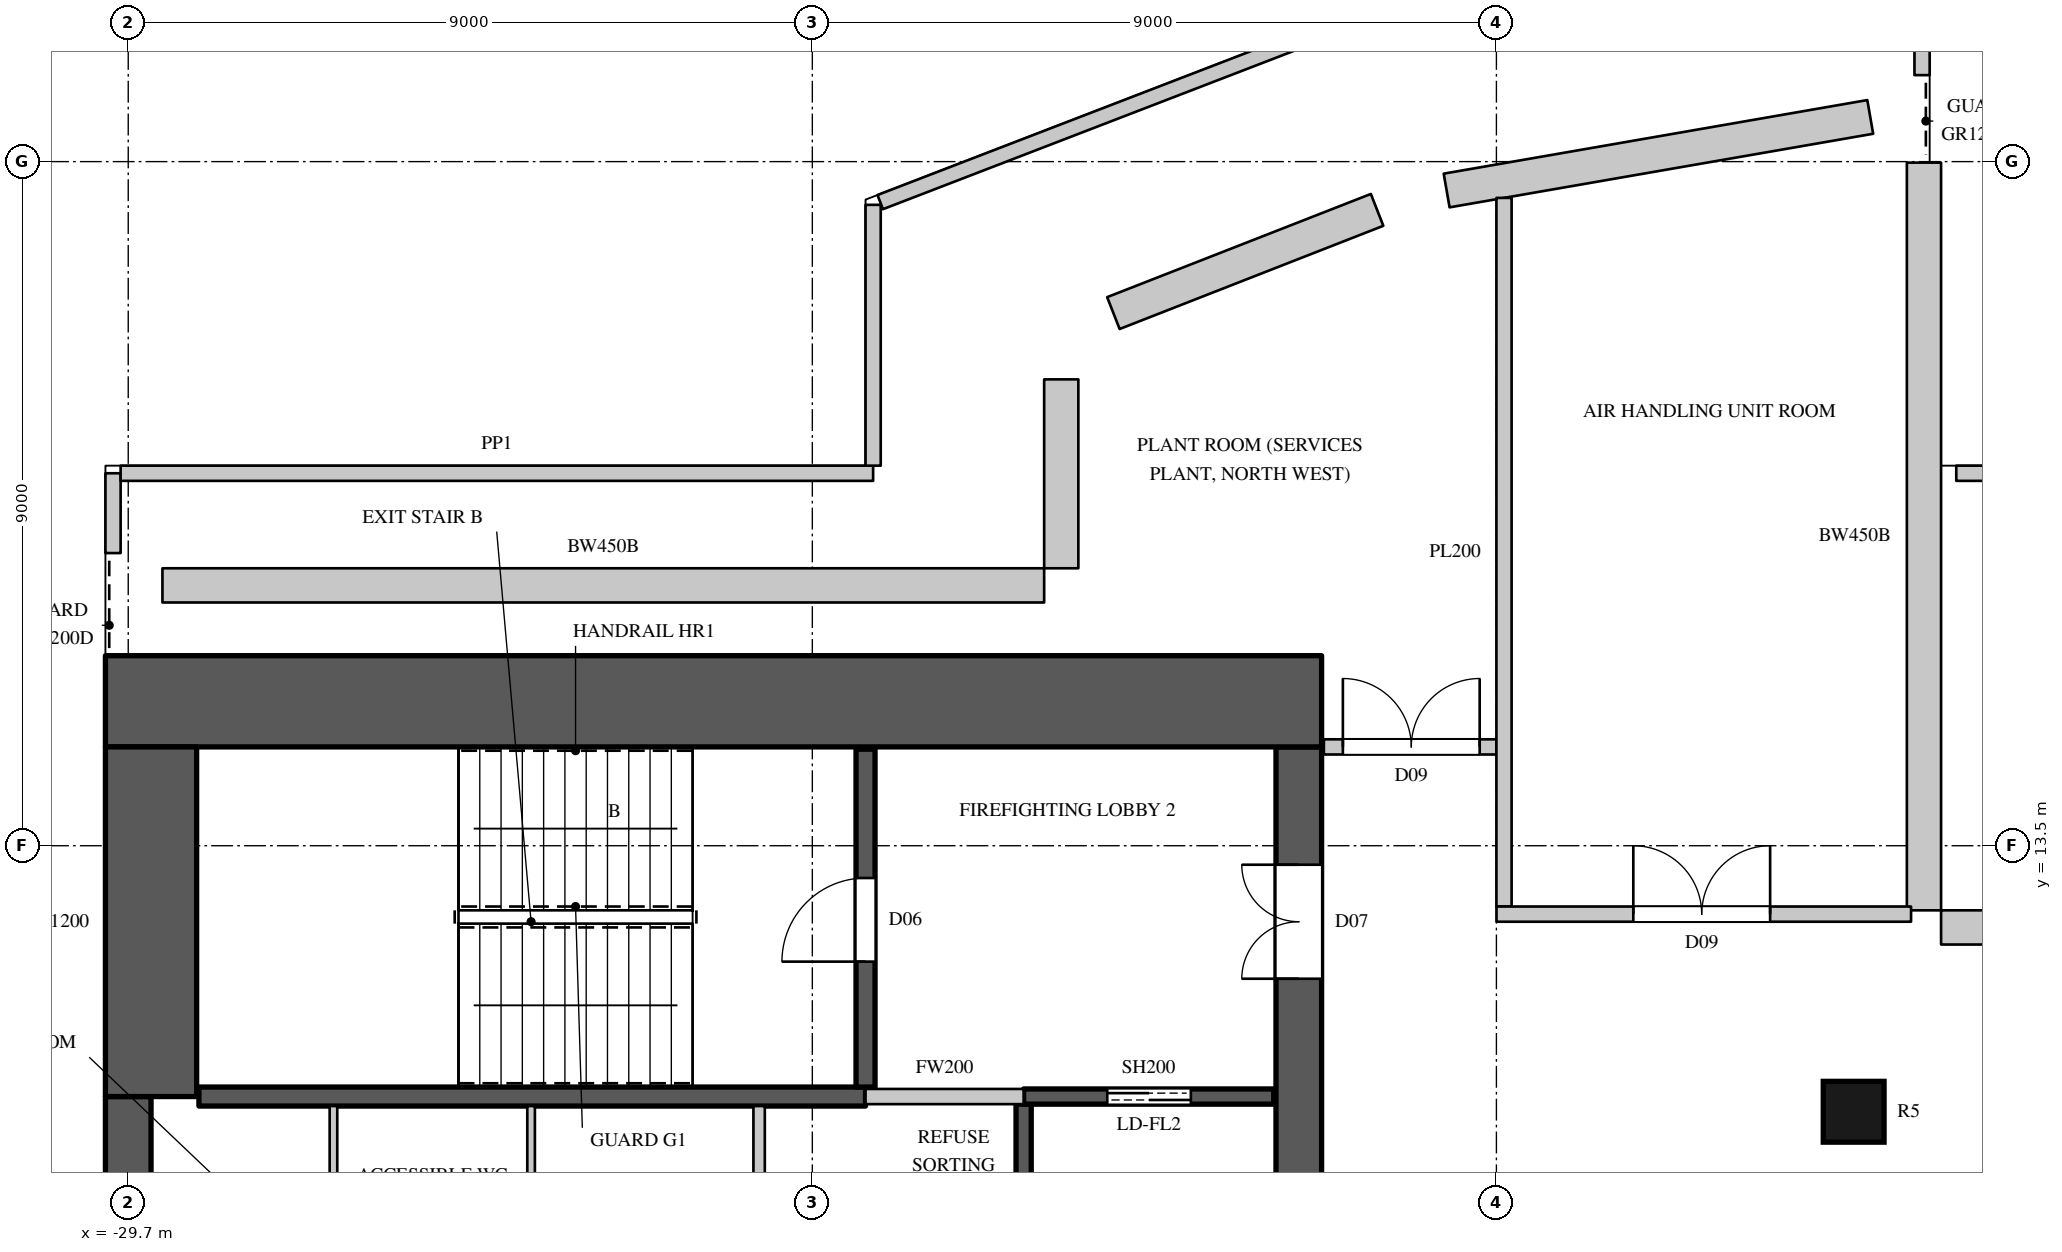
"""IFC4 building model, lengths in metres.
Left out: names, types, materials, properties, quantities, classifications, styles, units other than length and angle.
Written with IfcOpenShell. Run it as: python <this file> out.ifc"""

import sys

from ifc_helpers import new_model, si_unit, direction, frame, frame_2d, origin, origin_2d, place, context, subcontext, project, spatial, rectangle, circle, extrude, element, fill, save


model = new_model("IFC4")
c1 = context("Model", 3, precision=1e-05, world=origin(), true_north=direction((0.0, 1.0)))
c2 = subcontext(c1, "Body", "Model", "MODEL_VIEW")
j1 = project(units=[si_unit("LENGTHUNIT", "METRE"), si_unit("PLANEANGLEUNIT", "RADIAN")], contexts=[c1])
p1 = place(None, origin())
s1 = spatial("IfcSite", under=j1, at=p1, CompositionType="ELEMENT")
p2 = place(p1, origin())
s2 = spatial("IfcBuilding", under=s1, at=p2, CompositionType="ELEMENT")
p3 = place(p2, frame((0.0, 0.0, 343.0)))
s3 = spatial("IfcBuildingStorey", under=s2, at=p3, CompositionType="ELEMENT", Elevation=343.0)
p4 = place(p3, frame((-7.0, 10.0, 0.0), z_axis=(0.0, 0.0, 1.0), x_axis=(1.0, 0.0, 0.0)))
e1 = element("IfcColumn", 1, at=p4, inside=s3, PredefinedType="COLUMN", context=c2, shape_type="SweptSolid", body=[
    extrude(circle(Radius=0.4, at=origin_2d()), origin(), (0.0, 0.0, 1.0), 4.0),
])
p5 = place(p3, frame((-29.9, 17.35, 0.0), z_axis=(0.0, 0.0, 1.0), x_axis=(0.0, 1.0, 0.0)))
e2 = element("IfcWall", 2, at=p5, inside=s3, PredefinedType="SOLIDWALL", context=c2, shape_type="SweptSolid", body=[
    extrude(rectangle(XDim=1.05, YDim=0.2, at=frame_2d((0.525, 0.0))), origin(), (0.0, 0.0, 1.0), 1.1),
])
p6 = place(p3, frame((-29.8, 18.4, 0.0), z_axis=(0.0, 0.0, 1.0), x_axis=(1.0, 0.0, 0.0)))
e3 = element("IfcWall", 3, at=p6, inside=s3, PredefinedType="SOLIDWALL", context=c2, shape_type="SweptSolid", body=[
    extrude(rectangle(XDim=9.9, YDim=0.2, at=frame_2d((4.95, 0.0))), origin(), (0.0, 0.0, 1.0), 1.1),
])
p7 = place(p3, frame((-19.9, 18.5, 0.0), z_axis=(0.0, 0.0, 1.0), x_axis=(0.0, 1.0, 0.0)))
e4 = element("IfcWall", 4, at=p7, inside=s3, PredefinedType="SOLIDWALL", context=c2, shape_type="SweptSolid", body=[
    extrude(rectangle(XDim=3.431, YDim=0.2, at=frame_2d((1.716, 0.0))), origin(), (0.0, 0.0, 1.0), 1.1),
])
p8 = place(p3, frame((-19.807, 21.967, 0.0), z_axis=(0.0, 0.0, 1.0), x_axis=(0.933131239416, 0.359535937045, 0.0)))
e5 = element("IfcWall", 5, at=p8, inside=s3, PredefinedType="SOLIDWALL", context=c2, shape_type="SweptSolid", body=[
    extrude(rectangle(XDim=7.109, YDim=0.2, at=frame_2d((3.554, 0.0))), origin(), (0.0, 0.0, 1.0), 1.1),
])
p9 = place(p3, frame((-6.1, 25.651, 0.0), z_axis=(0.0, 0.0, 1.0), x_axis=(0.0, -1.0, 0.0)))
e6 = element("IfcWall", 6, at=p9, inside=s3, PredefinedType="SOLIDWALL", context=c2, shape_type="SweptSolid", body=[
    extrude(rectangle(XDim=2.013, YDim=0.2, at=frame_2d((1.006, 0.0))), origin(), (0.0, 0.0, 1.0), 1.1),
])
p10 = place(p3, frame((-5.65, 18.4, 0.0), z_axis=(0.0, 0.0, 1.0), x_axis=(1.0, 0.0, 0.0)))
e7 = element("IfcWall", 7, at=p10, inside=s3, PredefinedType="SOLIDWALL", context=c2, shape_type="SweptSolid", body=[
    extrude(rectangle(XDim=1.05, YDim=0.2, at=frame_2d((0.525, 0.0))), origin(), (0.0, 0.0, 1.0), 1.1),
])
p11 = place(p3, frame((7.85, 12.425, 0.0), z_axis=(0.0, 0.0, 1.0), x_axis=(-1.0, 0.0, 0.0)))
e8 = element("IfcWall", 8, at=p11, inside=s3, PredefinedType="SOLIDWALL", context=c2, shape_type="SweptSolid", body=[
    extrude(rectangle(XDim=13.7, YDim=0.45, at=frame_2d((6.85, 0.0))), origin(), (0.0, 0.0, 1.0), 3.7),
])
p12 = place(p3, frame((-6.075, 12.65, 0.0), z_axis=(0.0, 0.0, 1.0), x_axis=(0.0, 1.0, 0.0)))
e9 = element("IfcWall", 9, at=p12, inside=s3, PredefinedType="SOLIDWALL", context=c2, shape_type="SweptSolid", body=[
    extrude(rectangle(XDim=9.837, YDim=0.45, at=frame_2d((4.918, 0.0))), origin(), (0.0, 0.0, 1.0), 3.7),
])
p13 = place(p3, frame((-6.782, 23.088, 0.0), z_axis=(0.0, 0.0, 1.0), x_axis=(-0.985240251318, -0.171177239091, 0.0)))
e10 = element("IfcWall", 10, at=p13, inside=s3, PredefinedType="SOLIDWALL", context=c2, shape_type="SweptSolid", body=[
    extrude(rectangle(XDim=5.656, YDim=0.45, at=frame_2d((2.828, 0.0))), origin(), (0.0, 0.0, 1.0), 3.7),
])
p14 = place(p3, frame((-13.27, 21.865, 0.0), z_axis=(0.0, 0.0, 1.0), x_axis=(-0.931207968362, -0.364488298384, 0.0)))
e11 = element("IfcWall", 11, at=p14, inside=s3, PredefinedType="SOLIDWALL", context=c2, shape_type="SweptSolid", body=[
    extrude(rectangle(XDim=3.726, YDim=0.45, at=frame_2d((1.863, 0.0))), origin(), (0.0, 0.0, 1.0), 3.7),
])
p15 = place(p3, frame((-17.425, 19.635, 0.0), z_axis=(0.0, 0.0, 1.0), x_axis=(0.0, -1.0, 0.0)))
e12 = element("IfcWall", 12, at=p15, inside=s3, PredefinedType="SOLIDWALL", context=c2, shape_type="SweptSolid", body=[
    extrude(rectangle(XDim=2.485, YDim=0.45, at=frame_2d((1.243, 0.0))), origin(), (0.0, 0.0, 1.0), 3.7),
])
p16 = place(p3, frame((-17.65, 16.925, 0.0), z_axis=(0.0, 0.0, 1.0), x_axis=(-1.0, 0.0, 0.0)))
e13 = element("IfcWall", 13, at=p16, inside=s3, PredefinedType="SOLIDWALL", context=c2, shape_type="SweptSolid", body=[
    extrude(rectangle(XDim=11.6, YDim=0.45, at=frame_2d((5.8, 0.0))), origin(), (0.0, 0.0, 1.0), 3.7),
])
p17 = place(p3, frame((-30.0, 15.4, 0.0), z_axis=(0.0, 0.0, 1.0), x_axis=(1.0, 0.0, 0.0)))
e14 = element("IfcWall", 14, at=p17, inside=s3, PredefinedType="SHEAR", context=c2, shape_type="SweptSolid", body=[
    extrude(rectangle(XDim=16.0, YDim=1.2, at=frame_2d((8.0, 0.0))), origin(), (0.0, 0.0, 1.0), 4.0),
])
p18 = place(p3, frame((-14.3, -14.8, 0.0), z_axis=(0.0, 0.0, 1.0), x_axis=(0.0, 1.0, 0.0)))
e15 = element("IfcWall", 15, at=p18, inside=s3, PredefinedType="SHEAR", context=c2, shape_type="SweptSolid", body=[
    extrude(rectangle(XDim=29.6, YDim=0.6, at=frame_2d((14.8, 0.0))), origin(), (0.0, 0.0, 1.0), 4.0),
])
p19 = place(p18, frame((1.55, 0.0, 0.0)))
e16 = element("IfcOpeningElement", 16, at=p19, cuts=e15, PredefinedType="OPENING", context=c2, shape_type="SweptSolid", body=[
    extrude(rectangle(XDim=1.5, YDim=2.4, at=frame_2d((0.75, 1.2))), frame((0.0, 0.31, 0.0), z_axis=(0.0, -1.0, 0.0), x_axis=(1.0, 0.0, 0.0)), (0.0, 0.0, 1.0), 0.62),
])
p20 = place(p18, frame((26.55, 0.0, 0.0)))
e17 = element("IfcOpeningElement", 17, at=p20, cuts=e15, PredefinedType="OPENING", context=c2, shape_type="SweptSolid", body=[
    extrude(rectangle(XDim=1.5, YDim=2.4, at=frame_2d((0.75, 1.2))), frame((0.0, 0.31, 0.0), z_axis=(0.0, -1.0, 0.0), x_axis=(1.0, 0.0, 0.0)), (0.0, 0.0, 1.0), 0.62),
])
p21 = place(p18, frame((8.45, 0.0, 0.0)))
e18 = element("IfcOpeningElement", 18, at=p21, cuts=e15, PredefinedType="OPENING", context=c2, shape_type="SweptSolid", body=[
    extrude(rectangle(XDim=1.5, YDim=2.4, at=frame_2d((0.75, 1.2))), frame((0.0, 0.31, 0.0), z_axis=(0.0, -1.0, 0.0), x_axis=(1.0, 0.0, 0.0)), (0.0, 0.0, 1.0), 0.62),
])
p22 = place(p18, frame((19.65, 0.0, 0.0)))
e19 = element("IfcOpeningElement", 19, at=p22, cuts=e15, PredefinedType="OPENING", context=c2, shape_type="SweptSolid", body=[
    extrude(rectangle(XDim=1.5, YDim=2.4, at=frame_2d((0.75, 1.2))), frame((0.0, 0.31, 0.0), z_axis=(0.0, -1.0, 0.0), x_axis=(1.0, 0.0, 0.0)), (0.0, 0.0, 1.0), 0.62),
])
p23 = place(p18, frame((14.5, 0.0, 0.0)))
e20 = element("IfcOpeningElement", 20, at=p23, cuts=e15, PredefinedType="OPENING", context=c2, shape_type="SweptSolid", body=[
    extrude(rectangle(XDim=0.6, YDim=2.0, at=frame_2d((0.3, 1.0))), frame((0.0, 0.31, 0.0), z_axis=(0.0, -1.0, 0.0), x_axis=(1.0, 0.0, 0.0)), (0.0, 0.0, 1.0), 0.62),
])
p24 = place(p3, frame((-29.7, -10.2, 0.0), z_axis=(0.0, 0.0, 1.0), x_axis=(0.0, 1.0, 0.0)))
e21 = element("IfcWall", 21, at=p24, inside=s3, PredefinedType="SHEAR", context=c2, shape_type="SweptSolid", body=[
    extrude(rectangle(XDim=20.4, YDim=0.6, at=frame_2d((10.2, 0.0))), origin(), (0.0, 0.0, 1.0), 4.0),
])
p25 = place(p3, frame((-29.4, 10.2, 0.0), z_axis=(0.0, 0.0, 1.0), x_axis=(0.0, 1.0, 0.0)))
e22 = element("IfcWall", 22, at=p25, inside=s3, PredefinedType="SHEAR", context=c2, shape_type="SweptSolid", body=[
    extrude(rectangle(XDim=4.6, YDim=1.2, at=frame_2d((2.3, 0.0))), origin(), (0.0, 0.0, 1.0), 4.0),
])
p26 = place(p3, frame((-20.0, 10.2, 0.0), z_axis=(0.0, 0.0, 1.0), x_axis=(1.0, 0.0, 0.0)))
e23 = element("IfcWall", 23, at=p26, inside=s3, PredefinedType="PARTITIONING", context=c2, shape_type="SweptSolid", body=[
    extrude(rectangle(XDim=2.08, YDim=0.2, at=frame_2d((1.04, 0.0))), origin(), (0.0, 0.0, 1.0), 3.598),
])
p27 = place(p3, frame((-21.4, 7.5, 0.0), z_axis=(0.0, 0.0, 1.0), x_axis=(0.0, 1.0, 0.0)))
e24 = element("IfcWall", 24, at=p27, inside=s3, PredefinedType="PARTITIONING", context=c2, shape_type="SweptSolid", body=[
    extrude(rectangle(XDim=2.575, YDim=0.15, at=frame_2d((1.288, 0.0))), origin(), (0.0, 0.0, 1.0), 3.598),
])
p28 = place(p3, frame((-13.97, 14.8, 0.0), z_axis=(0.0, 0.0, 1.0), x_axis=(1.0, 0.0, 0.0)))
e25 = element("IfcWall", 25, at=p28, inside=s3, PredefinedType="PARTITIONING", context=c2, shape_type="SweptSolid", body=[
    extrude(rectangle(XDim=2.27, YDim=0.2, at=frame_2d((1.135, 0.0))), origin(), (0.0, 0.0, 1.0), 3.598),
])
p29 = place(p28, frame((0.25, 0.0, 0.0)))
e26 = element("IfcOpeningElement", 26, at=p29, cuts=e25, PredefinedType="OPENING", context=c2, shape_type="SweptSolid", body=[
    extrude(rectangle(XDim=1.8, YDim=2.4, at=frame_2d((0.9, 1.2))), frame((0.0, 0.11, 0.0), z_axis=(0.0, -1.0, 0.0), x_axis=(1.0, 0.0, 0.0)), (0.0, 0.0, 1.0), 0.22),
])
p30 = place(p3, frame((-11.6, 12.701, 0.0), z_axis=(0.0, 0.0, 1.0), x_axis=(0.0, 1.0, 0.0)))
e27 = element("IfcWall", 27, at=p30, inside=s3, PredefinedType="PARTITIONING", context=c2, shape_type="SweptSolid", body=[
    extrude(rectangle(XDim=9.322, YDim=0.2, at=frame_2d((4.661, 0.0))), origin(), (0.0, 0.0, 1.0), 3.598),
])
p31 = place(p3, frame((-11.699, 12.6, 0.0), z_axis=(0.0, 0.0, 1.0), x_axis=(1.0, 0.0, 0.0)))
e28 = element("IfcWall", 28, at=p31, inside=s3, PredefinedType="PARTITIONING", context=c2, shape_type="SweptSolid", body=[
    extrude(rectangle(XDim=5.454, YDim=0.2, at=frame_2d((2.727, 0.0))), origin(), (0.0, 0.0, 1.0), 3.598),
])
p32 = place(p31, frame((1.8, 0.0, 0.0)))
e29 = element("IfcOpeningElement", 29, at=p32, cuts=e28, PredefinedType="OPENING", context=c2, shape_type="SweptSolid", body=[
    extrude(rectangle(XDim=1.8, YDim=2.4, at=frame_2d((0.9, 1.2))), frame((0.0, 0.11, 0.0), z_axis=(0.0, -1.0, 0.0), x_axis=(1.0, 0.0, 0.0)), (0.0, 0.0, 1.0), 0.22),
])
p33 = place(p3, frame((-17.92, 7.5, 0.0), z_axis=(0.0, 0.0, 1.0), x_axis=(0.0, 1.0, 0.0)))
e30 = element("IfcWall", 30, at=p33, inside=s3, PredefinedType="SHEAR", context=c2, shape_type="SweptSolid", body=[
    extrude(rectangle(XDim=2.6, YDim=0.2, at=frame_2d((1.3, 0.0))), origin(), (0.0, 0.0, 1.0), 3.598),
])
p34 = place(p3, frame((-17.92, 10.2, 0.0), z_axis=(0.0, 0.0, 1.0), x_axis=(1.0, 0.0, 0.0)))
e31 = element("IfcWall", 31, at=p34, inside=s3, PredefinedType="SHEAR", context=c2, shape_type="SweptSolid", body=[
    extrude(rectangle(XDim=3.29, YDim=0.2, at=frame_2d((1.645, 0.0))), origin(), (0.0, 0.0, 1.0), 3.598),
])
p35 = place(p34, frame((1.1, 0.0, 0.0)))
e32 = element("IfcOpeningElement", 32, at=p35, cuts=e31, PredefinedType="OPENING", context=c2, shape_type="SweptSolid", body=[
    extrude(rectangle(XDim=1.1, YDim=2.2, at=frame_2d((0.55, 1.1))), frame((0.0, 0.11, 0.0), z_axis=(0.0, -1.0, 0.0), x_axis=(1.0, 0.0, 0.0)), (0.0, 0.0, 1.0), 0.22),
])
p36 = place(p3, frame((-28.77, 10.2, 0.0), z_axis=(0.0, 0.0, 1.0), x_axis=(1.0, 0.0, 0.0)))
e33 = element("IfcWall", 33, at=p36, inside=s3, PredefinedType="SHEAR", context=c2, shape_type="SweptSolid", body=[
    extrude(rectangle(XDim=8.77, YDim=0.25, at=frame_2d((4.385, 0.0))), origin(), (0.0, 0.0, 1.0), 3.598),
])
p37 = place(p3, frame((-20.0, 10.325, 0.0), z_axis=(0.0, 0.0, 1.0), x_axis=(0.0, 1.0, 0.0)))
e34 = element("IfcWall", 34, at=p37, inside=s3, PredefinedType="SHEAR", context=c2, shape_type="SweptSolid", body=[
    extrude(rectangle(XDim=4.445, YDim=0.25, at=frame_2d((2.223, 0.0))), origin(), (0.0, 0.0, 1.0), 3.598),
])
p38 = place(p37, frame((1.65, 0.0, 0.0)))
e35 = element("IfcOpeningElement", 35, at=p38, cuts=e34, PredefinedType="OPENING", context=c2, shape_type="SweptSolid", body=[
    extrude(rectangle(XDim=1.1, YDim=2.2, at=frame_2d((0.55, 1.1))), frame((0.0, 0.135, 0.0), z_axis=(0.0, -1.0, 0.0), x_axis=(1.0, 0.0, 0.0)), (0.0, 0.0, 1.0), 0.27),
])
for number, where, z_axis, x_axis in (
    (36, (-27.0, 7.5, 0.0), (0.0, 0.0, 1.0), (0.0, 1.0, 0.0)),
    (37, (-24.4, 7.5, 0.0), (0.0, 0.0, 1.0), (0.0, 1.0, 0.0)),
):
    element("IfcWall", number, at=place(p3, frame(where, z_axis=z_axis, x_axis=x_axis)), inside=s3, PredefinedType="PARTITIONING", context=c2, shape_type="SweptSolid", body=[
        extrude(rectangle(XDim=2.575, YDim=0.1, at=frame_2d((1.288, 0.0))), origin(), (0.0, 0.0, 1.0), 3.598),
    ])
p39 = place(p38, origin())
e38 = element("IfcDoor", 38, at=p39, inside=s3, OperationType="SINGLE_SWING_LEFT", PredefinedType="DOOR", context=c2, shape_type="SweptSolid", body=[
    extrude(rectangle(XDim=1.1, YDim=2.2, at=frame_2d((0.55, 1.1))), frame((0.0, 0.025, 0.0), z_axis=(0.0, -1.0, 0.0), x_axis=(1.0, 0.0, 0.0)), (0.0, 0.0, 1.0), 0.05),
])
fill(e35, e38)
p40 = place(p35, origin())
e39 = element("IfcDoor", 39, at=p40, inside=s3, OperationType="DOUBLE_DOOR_SLIDING", PredefinedType="DOOR", context=c2, shape_type="SweptSolid", body=[
    extrude(rectangle(XDim=1.1, YDim=2.2, at=frame_2d((0.55, 1.1))), frame((0.0, 0.025, 0.0), z_axis=(0.0, -1.0, 0.0), x_axis=(1.0, 0.0, 0.0)), (0.0, 0.0, 1.0), 0.05),
])
fill(e32, e39)
p41 = place(p32, origin())
e40 = element("IfcDoor", 40, at=p41, inside=s3, OperationType="DOUBLE_DOOR_SINGLE_SWING", PredefinedType="DOOR", context=c2, shape_type="SweptSolid", body=[
    extrude(rectangle(XDim=1.8, YDim=2.4, at=frame_2d((0.9, 1.2))), frame((0.0, 0.025, 0.0), z_axis=(0.0, -1.0, 0.0), x_axis=(1.0, 0.0, 0.0)), (0.0, 0.0, 1.0), 0.05),
])
fill(e29, e40)
p42 = place(p29, origin())
e41 = element("IfcDoor", 41, at=p42, inside=s3, OperationType="DOUBLE_DOOR_SINGLE_SWING", PredefinedType="DOOR", context=c2, shape_type="SweptSolid", body=[
    extrude(rectangle(XDim=1.8, YDim=2.4, at=frame_2d((0.9, 1.2))), frame((0.0, 0.025, 0.0), z_axis=(0.0, -1.0, 0.0), x_axis=(1.0, 0.0, 0.0)), (0.0, 0.0, 1.0), 0.05),
])
fill(e26, e41)
p43 = place(p20, origin())
e42 = element("IfcDoor", 42, at=p43, inside=s3, OperationType="DOUBLE_DOOR_SINGLE_SWING", PredefinedType="DOOR", context=c2, shape_type="SweptSolid", body=[
    extrude(rectangle(XDim=1.5, YDim=2.4, at=frame_2d((0.75, 1.2))), frame((0.0, 0.295, 0.0), z_axis=(0.0, -1.0, 0.0), x_axis=(1.0, 0.0, 0.0)), (0.0, 0.0, 1.0), 0.05),
])
fill(e17, e42)
save(model, sys.argv[1])
